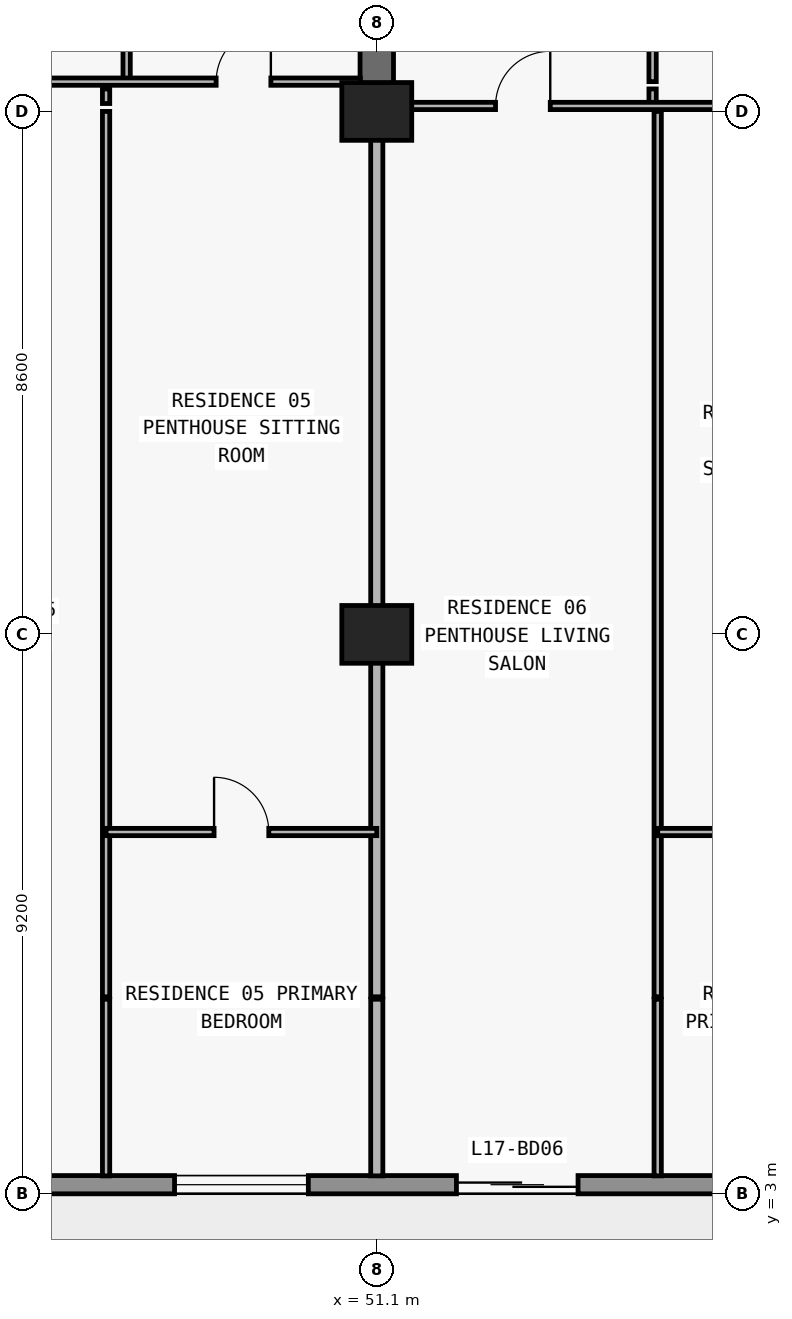
"""IFC4 building model, lengths in metres.
Left out: names, types, materials, properties, quantities, classifications, styles, units other than length and angle.
Written with IfcOpenShell. Run it as: python <this file> out.ifc"""

import sys

from ifc_helpers import new_model, si_unit, direction, frame, frame_2d, origin, origin_2d, place, context, subcontext, project, spatial, rectangle, extrude, element, fill, save


model = new_model("IFC4")
c1 = context("Model", 3, precision=1e-05, world=origin(), true_north=direction((0.0, 1.0)))
c2 = subcontext(c1, "Body", "Model", "MODEL_VIEW")
j1 = project(units=[si_unit("LENGTHUNIT", "METRE"), si_unit("PLANEANGLEUNIT", "RADIAN")], contexts=[c1])
p1 = place(None, origin())
s1 = spatial("IfcSite", under=j1, at=p1, CompositionType="ELEMENT")
p2 = place(p1, origin())
s2 = spatial("IfcBuilding", under=s1, at=p2, CompositionType="ELEMENT")
p3 = place(p2, frame((0.0, 0.0, 66.3)))
s3 = spatial("IfcBuildingStorey", under=s2, at=p3, CompositionType="ELEMENT", Elevation=66.3)
for number, where, z_axis, x_axis in (
    (1, (51.1, 12.2, 0.0), (0.0, 0.0, 1.0), (1.0, 0.0, 0.0)),
    (2, (51.1, 20.8, 0.0), (0.0, 0.0, 1.0), (1.0, 0.0, 0.0)),
):
    element("IfcColumn", number, at=place(p3, frame(where, z_axis=z_axis, x_axis=x_axis)), inside=s3, PredefinedType="COLUMN", context=c2, shape_type="SweptSolid", body=[
        extrude(rectangle(XDim=1.15, YDim=0.95, at=origin_2d()), origin(), (0.0, 0.0, 1.0), 3.05),
    ])
p4 = place(p3, frame((51.1, 20.8, 0.0), z_axis=(0.0, 0.0, 1.0), x_axis=(0.0, 1.0, 0.0)))
e3 = element("IfcWall", 3, at=p4, inside=s3, PredefinedType="SHEAR", context=c2, shape_type="SweptSolid", body=[
    extrude(rectangle(XDim=8.6, YDim=0.55, at=frame_2d((4.3, 0.0))), origin(), (0.0, 0.0, 1.0), 3.05),
])
p5 = place(p3, frame((72.7, 3.15, 0.0), z_axis=(0.0, 0.0, 1.0), x_axis=(-1.0, 0.0, 0.0)))
e4 = element("IfcWall", 4, at=p5, inside=s3, PredefinedType="STANDARD", context=c2, shape_type="SweptSolid", body=[
    extrude(rectangle(XDim=67.6, YDim=0.3, at=frame_2d((33.8, 0.0))), origin(), (0.0, 0.0, 1.0), 3.05),
])
p6 = place(p5, frame((59.826, 0.0, 0.0)))
e5 = element("IfcOpeningElement", 5, at=p6, cuts=e4, PredefinedType="OPENING", context=c2, shape_type="SweptSolid", body=[
    extrude(rectangle(XDim=2.0, YDim=2.3, at=frame_2d((1.0, 1.15))), frame((0.0, 0.16, 0.0), z_axis=(0.0, -1.0, 0.0), x_axis=(1.0, 0.0, 0.0)), (0.0, 0.0, 1.0), 0.32),
])
p7 = place(p5, frame((55.526, 0.0, 0.85)))
e6 = element("IfcOpeningElement", 6, at=p7, cuts=e4, PredefinedType="OPENING", context=c2, shape_type="SweptSolid", body=[
    extrude(rectangle(XDim=2.2, YDim=1.55, at=frame_2d((1.1, 0.775))), frame((0.0, 0.16, 0.0), z_axis=(0.0, -1.0, 0.0), x_axis=(1.0, 0.0, 0.0)), (0.0, 0.0, 1.0), 0.32),
])
p8 = place(p5, frame((51.09, 0.0, 0.0)))
e7 = element("IfcOpeningElement", 7, at=p8, cuts=e4, PredefinedType="OPENING", context=c2, shape_type="SweptSolid", body=[
    extrude(rectangle(XDim=2.0, YDim=2.3, at=frame_2d((1.0, 1.15))), frame((0.0, 0.16, 0.0), z_axis=(0.0, -1.0, 0.0), x_axis=(1.0, 0.0, 0.0)), (0.0, 0.0, 1.0), 0.32),
])
p9 = place(p5, frame((46.99, 0.0, 0.85)))
e8 = element("IfcOpeningElement", 8, at=p9, cuts=e4, PredefinedType="OPENING", context=c2, shape_type="SweptSolid", body=[
    extrude(rectangle(XDim=1.8, YDim=1.55, at=frame_2d((0.9, 0.775))), frame((0.0, 0.16, 0.0), z_axis=(0.0, -1.0, 0.0), x_axis=(1.0, 0.0, 0.0)), (0.0, 0.0, 1.0), 0.32),
])
p10 = place(p5, frame((43.026, 0.0, 0.0)))
e9 = element("IfcOpeningElement", 9, at=p10, cuts=e4, PredefinedType="OPENING", context=c2, shape_type="SweptSolid", body=[
    extrude(rectangle(XDim=2.0, YDim=2.3, at=frame_2d((1.0, 1.15))), frame((0.0, 0.16, 0.0), z_axis=(0.0, -1.0, 0.0), x_axis=(1.0, 0.0, 0.0)), (0.0, 0.0, 1.0), 0.32),
])
p11 = place(p5, frame((38.726, 0.0, 0.85)))
e10 = element("IfcOpeningElement", 10, at=p11, cuts=e4, PredefinedType="OPENING", context=c2, shape_type="SweptSolid", body=[
    extrude(rectangle(XDim=2.2, YDim=1.55, at=frame_2d((1.1, 0.775))), frame((0.0, 0.16, 0.0), z_axis=(0.0, -1.0, 0.0), x_axis=(1.0, 0.0, 0.0)), (0.0, 0.0, 1.0), 0.32),
])
p12 = place(p5, frame((34.51, 0.0, 0.0)))
e11 = element("IfcOpeningElement", 11, at=p12, cuts=e4, PredefinedType="OPENING", context=c2, shape_type="SweptSolid", body=[
    extrude(rectangle(XDim=2.0, YDim=2.3, at=frame_2d((1.0, 1.15))), frame((0.0, 0.16, 0.0), z_axis=(0.0, -1.0, 0.0), x_axis=(1.0, 0.0, 0.0)), (0.0, 0.0, 1.0), 0.32),
])
p13 = place(p5, frame((30.81, 0.0, 0.85)))
e12 = element("IfcOpeningElement", 12, at=p13, cuts=e4, PredefinedType="OPENING", context=c2, shape_type="SweptSolid", body=[
    extrude(rectangle(XDim=1.8, YDim=1.55, at=frame_2d((0.9, 0.775))), frame((0.0, 0.16, 0.0), z_axis=(0.0, -1.0, 0.0), x_axis=(1.0, 0.0, 0.0)), (0.0, 0.0, 1.0), 0.32),
])
p14 = place(p5, frame((27.026, 0.0, 0.0)))
e13 = element("IfcOpeningElement", 13, at=p14, cuts=e4, PredefinedType="OPENING", context=c2, shape_type="SweptSolid", body=[
    extrude(rectangle(XDim=2.0, YDim=2.3, at=frame_2d((1.0, 1.15))), frame((0.0, 0.16, 0.0), z_axis=(0.0, -1.0, 0.0), x_axis=(1.0, 0.0, 0.0)), (0.0, 0.0, 1.0), 0.32),
])
p15 = place(p5, frame((22.726, 0.0, 0.85)))
e14 = element("IfcOpeningElement", 14, at=p15, cuts=e4, PredefinedType="OPENING", context=c2, shape_type="SweptSolid", body=[
    extrude(rectangle(XDim=2.2, YDim=1.55, at=frame_2d((1.1, 0.775))), frame((0.0, 0.16, 0.0), z_axis=(0.0, -1.0, 0.0), x_axis=(1.0, 0.0, 0.0)), (0.0, 0.0, 1.0), 0.32),
])
p16 = place(p5, frame((18.29, 0.0, 0.0)))
e15 = element("IfcOpeningElement", 15, at=p16, cuts=e4, PredefinedType="OPENING", context=c2, shape_type="SweptSolid", body=[
    extrude(rectangle(XDim=2.0, YDim=2.3, at=frame_2d((1.0, 1.15))), frame((0.0, 0.16, 0.0), z_axis=(0.0, -1.0, 0.0), x_axis=(1.0, 0.0, 0.0)), (0.0, 0.0, 1.0), 0.32),
])
p17 = place(p5, frame((14.19, 0.0, 0.85)))
e16 = element("IfcOpeningElement", 16, at=p17, cuts=e4, PredefinedType="OPENING", context=c2, shape_type="SweptSolid", body=[
    extrude(rectangle(XDim=1.8, YDim=1.55, at=frame_2d((0.9, 0.775))), frame((0.0, 0.16, 0.0), z_axis=(0.0, -1.0, 0.0), x_axis=(1.0, 0.0, 0.0)), (0.0, 0.0, 1.0), 0.32),
])
p18 = place(p5, frame((10.226, 0.0, 0.0)))
e17 = element("IfcOpeningElement", 17, at=p18, cuts=e4, PredefinedType="OPENING", context=c2, shape_type="SweptSolid", body=[
    extrude(rectangle(XDim=2.0, YDim=2.3, at=frame_2d((1.0, 1.15))), frame((0.0, 0.16, 0.0), z_axis=(0.0, -1.0, 0.0), x_axis=(1.0, 0.0, 0.0)), (0.0, 0.0, 1.0), 0.32),
])
p19 = place(p5, frame((5.926, 0.0, 0.85)))
e18 = element("IfcOpeningElement", 18, at=p19, cuts=e4, PredefinedType="OPENING", context=c2, shape_type="SweptSolid", body=[
    extrude(rectangle(XDim=2.2, YDim=1.55, at=frame_2d((1.1, 0.775))), frame((0.0, 0.16, 0.0), z_axis=(0.0, -1.0, 0.0), x_axis=(1.0, 0.0, 0.0)), (0.0, 0.0, 1.0), 0.32),
])
p20 = place(p3, frame((46.648, 3.295, 0.0), z_axis=(0.0, 0.0, 1.0), x_axis=(0.0, 1.0, 0.0)))
e19 = element("IfcWall", 19, at=p20, inside=s3, PredefinedType="PARTITIONING", context=c2, shape_type="SweptSolid", body=[
    extrude(rectangle(XDim=2.905, YDim=0.12, at=frame_2d((1.453, 0.0))), origin(), (0.0, 0.0, 1.0), 3.05),
])
p21 = place(p3, frame((46.648, 6.24, 0.0), z_axis=(0.0, 0.0, 1.0), x_axis=(0.0, 1.0, 0.0)))
e20 = element("IfcWall", 20, at=p21, inside=s3, PredefinedType="PARTITIONING", context=c2, shape_type="SweptSolid", body=[
    extrude(rectangle(XDim=14.56, YDim=0.12, at=frame_2d((7.28, 0.0))), origin(), (0.0, 0.0, 1.0), 2.423),
])
p22 = place(p3, frame((46.648, 20.93, 0.0), z_axis=(0.0, 0.0, 1.0), x_axis=(0.0, 1.0, 0.0)))
e21 = element("IfcWall", 21, at=p22, inside=s3, PredefinedType="PARTITIONING", context=c2, shape_type="SweptSolid", body=[
    extrude(rectangle(XDim=0.24, YDim=0.12, at=frame_2d((0.12, 0.0))), origin(), (0.0, 0.0, 1.0), 2.423),
])
p23 = place(p3, frame((46.986, 21.29, 0.0), z_axis=(0.0, 0.0, 1.0), x_axis=(0.0, 1.0, 0.0)))
e22 = element("IfcWall", 22, at=p23, inside=s3, PredefinedType="PARTITIONING", context=c2, shape_type="SweptSolid", body=[
    extrude(rectangle(XDim=4.69, YDim=0.12, at=frame_2d((2.345, 0.0))), origin(), (0.0, 0.0, 1.0), 2.423),
])
p24 = place(p23, frame((1.895, 0.0, 0.0)))
e23 = element("IfcOpeningElement", 23, at=p24, cuts=e22, PredefinedType="OPENING", context=c2, shape_type="SweptSolid", body=[
    extrude(rectangle(XDim=0.9, YDim=2.15, at=frame_2d((0.45, 1.075))), frame((0.0, 0.07, 0.0), z_axis=(0.0, -1.0, 0.0), x_axis=(1.0, 0.0, 0.0)), (0.0, 0.0, 1.0), 0.14),
])
p25 = place(p3, frame((51.1, 3.295, 0.0), z_axis=(0.0, 0.0, 1.0), x_axis=(0.0, 1.0, 0.0)))
e24 = element("IfcWall", 24, at=p25, inside=s3, PredefinedType="PARTITIONING", context=c2, shape_type="SweptSolid", body=[
    extrude(rectangle(XDim=2.905, YDim=0.2, at=frame_2d((1.453, 0.0))), origin(), (0.0, 0.0, 1.0), 3.05),
])
p26 = place(p3, frame((51.1, 6.24, 0.0), z_axis=(0.0, 0.0, 1.0), x_axis=(0.0, 1.0, 0.0)))
e25 = element("IfcWall", 25, at=p26, inside=s3, PredefinedType="PARTITIONING", context=c2, shape_type="SweptSolid", body=[
    extrude(rectangle(XDim=14.555, YDim=0.2, at=frame_2d((7.277, 0.0))), origin(), (0.0, 0.0, 1.0), 2.11),
])
p27 = place(p3, frame((55.636, 20.93, 0.0), z_axis=(0.0, 0.0, 1.0), x_axis=(0.0, 1.0, 0.0)))
e26 = element("IfcWall", 26, at=p27, inside=s3, PredefinedType="PARTITIONING", context=c2, shape_type="SweptSolid", body=[
    extrude(rectangle(XDim=0.24, YDim=0.12, at=frame_2d((0.12, 0.0))), origin(), (0.0, 0.0, 1.0), 3.05),
])
p28 = place(p3, frame((55.636, 21.29, 0.0), z_axis=(0.0, 0.0, 1.0), x_axis=(0.0, 1.0, 0.0)))
e27 = element("IfcWall", 27, at=p28, inside=s3, PredefinedType="PARTITIONING", context=c2, shape_type="SweptSolid", body=[
    extrude(rectangle(XDim=4.69, YDim=0.12, at=frame_2d((2.345, 0.0))), origin(), (0.0, 0.0, 1.0), 3.05),
])
p29 = place(p28, frame((1.895, 0.0, 0.0)))
e28 = element("IfcOpeningElement", 28, at=p29, cuts=e27, PredefinedType="OPENING", context=c2, shape_type="SweptSolid", body=[
    extrude(rectangle(XDim=0.9, YDim=2.15, at=frame_2d((0.45, 1.075))), frame((0.0, 0.07, 0.0), z_axis=(0.0, -1.0, 0.0), x_axis=(1.0, 0.0, 0.0)), (0.0, 0.0, 1.0), 0.14),
])
p30 = place(p3, frame((55.72, 3.295, 0.0), z_axis=(0.0, 0.0, 1.0), x_axis=(0.0, 1.0, 0.0)))
e29 = element("IfcWall", 29, at=p30, inside=s3, PredefinedType="PARTITIONING", context=c2, shape_type="SweptSolid", body=[
    extrude(rectangle(XDim=2.905, YDim=0.12, at=frame_2d((1.453, 0.0))), origin(), (0.0, 0.0, 1.0), 3.05),
])
p31 = place(p3, frame((55.72, 6.24, 0.0), z_axis=(0.0, 0.0, 1.0), x_axis=(0.0, 1.0, 0.0)))
e30 = element("IfcWall", 30, at=p31, inside=s3, PredefinedType="PARTITIONING", context=c2, shape_type="SweptSolid", body=[
    extrude(rectangle(XDim=14.56, YDim=0.12, at=frame_2d((7.28, 0.0))), origin(), (0.0, 0.0, 1.0), 3.05),
])
p32 = place(p3, frame((46.648, 8.95, 0.0), z_axis=(0.0, 0.0, 1.0), x_axis=(1.0, 0.0, 0.0)))
e31 = element("IfcWall", 31, at=p32, inside=s3, PredefinedType="PARTITIONING", context=c2, shape_type="SweptSolid", body=[
    extrude(rectangle(XDim=4.452, YDim=0.12, at=frame_2d((2.226, 0.0))), origin(), (0.0, 0.0, 1.0), 3.05),
])
p33 = place(p32, frame((1.776, 0.0, 0.0)))
e32 = element("IfcOpeningElement", 32, at=p33, cuts=e31, PredefinedType="OPENING", context=c2, shape_type="SweptSolid", body=[
    extrude(rectangle(XDim=0.9, YDim=2.15, at=frame_2d((0.45, 1.075))), frame((0.0, 0.07, 0.0), z_axis=(0.0, -1.0, 0.0), x_axis=(1.0, 0.0, 0.0)), (0.0, 0.0, 1.0), 0.14),
])
p34 = place(p3, frame((55.72, 8.95, 0.0), z_axis=(0.0, 0.0, 1.0), x_axis=(1.0, 0.0, 0.0)))
e33 = element("IfcWall", 33, at=p34, inside=s3, PredefinedType="PARTITIONING", context=c2, shape_type="SweptSolid", body=[
    extrude(rectangle(XDim=3.78, YDim=0.12, at=frame_2d((1.89, 0.0))), origin(), (0.0, 0.0, 1.0), 3.05),
])
p35 = place(p34, frame((1.44, 0.0, 0.0)))
e34 = element("IfcOpeningElement", 34, at=p35, cuts=e33, PredefinedType="OPENING", context=c2, shape_type="SweptSolid", body=[
    extrude(rectangle(XDim=0.9, YDim=2.15, at=frame_2d((0.45, 1.075))), frame((0.0, 0.07, 0.0), z_axis=(0.0, -1.0, 0.0), x_axis=(1.0, 0.0, 0.0)), (0.0, 0.0, 1.0), 0.14),
])
p36 = place(p3, frame((51.37, 20.89, 0.0), z_axis=(0.0, 0.0, 1.0), x_axis=(1.0, 0.0, 0.0)))
e35 = element("IfcWall", 35, at=p36, inside=s3, PredefinedType="PARTITIONING", context=c2, shape_type="SweptSolid", body=[
    extrude(rectangle(XDim=8.13, YDim=0.12, at=frame_2d((4.065, 0.0))), origin(), (0.0, 0.0, 1.0), 2.11),
])
p37 = place(p36, frame((1.683, 0.0, 0.0)))
e36 = element("IfcOpeningElement", 36, at=p37, cuts=e35, PredefinedType="OPENING", context=c2, shape_type="SweptSolid", body=[
    extrude(rectangle(XDim=0.9, YDim=2.06, at=frame_2d((0.45, 1.03))), frame((0.0, 0.07, 0.0), z_axis=(0.0, -1.0, 0.0), x_axis=(1.0, 0.0, 0.0)), (0.0, 0.0, 1.0), 0.14),
])
p38 = place(p36, frame((5.79, 0.0, 0.0)))
e37 = element("IfcOpeningElement", 37, at=p38, cuts=e35, PredefinedType="OPENING", context=c2, shape_type="SweptSolid", body=[
    extrude(rectangle(XDim=0.9, YDim=2.06, at=frame_2d((0.45, 1.03))), frame((0.0, 0.07, 0.0), z_axis=(0.0, -1.0, 0.0), x_axis=(1.0, 0.0, 0.0)), (0.0, 0.0, 1.0), 0.14),
])
p39 = place(p3, frame((42.7, 21.29, 0.0), z_axis=(0.0, 0.0, 1.0), x_axis=(1.0, 0.0, 0.0)))
e38 = element("IfcWall", 38, at=p39, inside=s3, PredefinedType="PARTITIONING", context=c2, shape_type="SweptSolid", body=[
    extrude(rectangle(XDim=8.13, YDim=0.12, at=frame_2d((4.065, 0.0))), origin(), (0.0, 0.0, 1.0), 3.05),
])
p40 = place(p39, frame((1.524, 0.0, 0.0)))
e39 = element("IfcOpeningElement", 39, at=p40, cuts=e38, PredefinedType="OPENING", context=c2, shape_type="SweptSolid", body=[
    extrude(rectangle(XDim=0.9, YDim=2.15, at=frame_2d((0.45, 1.075))), frame((0.0, 0.07, 0.0), z_axis=(0.0, -1.0, 0.0), x_axis=(1.0, 0.0, 0.0)), (0.0, 0.0, 1.0), 0.14),
])
p41 = place(p39, frame((5.758, 0.0, 0.0)))
e40 = element("IfcOpeningElement", 40, at=p41, cuts=e38, PredefinedType="OPENING", context=c2, shape_type="SweptSolid", body=[
    extrude(rectangle(XDim=0.9, YDim=2.15, at=frame_2d((0.45, 1.075))), frame((0.0, 0.07, 0.0), z_axis=(0.0, -1.0, 0.0), x_axis=(1.0, 0.0, 0.0)), (0.0, 0.0, 1.0), 0.14),
])
p42 = place(p15, origin())
e41 = element("IfcWindow", 41, at=p42, inside=s3, PartitioningType="SINGLE_PANEL", PredefinedType="WINDOW", context=c2, shape_type="SweptSolid", body=[
    extrude(rectangle(XDim=2.2, YDim=1.55, at=frame_2d((1.1, 0.775))), frame((0.0, 0.03, 0.0), z_axis=(0.0, -1.0, 0.0), x_axis=(1.0, 0.0, 0.0)), (0.0, 0.0, 1.0), 0.06),
])
fill(e14, e41)
p43 = place(p16, origin())
e42 = element("IfcDoor", 42, at=p43, inside=s3, OperationType="DOUBLE_DOOR_SLIDING", PredefinedType="DOOR", context=c2, shape_type="SweptSolid", body=[
    extrude(rectangle(XDim=2.0, YDim=2.3, at=frame_2d((1.0, 1.15))), frame((0.0, 0.025, 0.0), z_axis=(0.0, -1.0, 0.0), x_axis=(1.0, 0.0, 0.0)), (0.0, 0.0, 1.0), 0.05),
])
fill(e15, e42)
p44 = place(p41, origin())
e43 = element("IfcDoor", 43, at=p44, inside=s3, OperationType="SINGLE_SWING_RIGHT", PredefinedType="DOOR", context=c2, shape_type="SweptSolid", body=[
    extrude(rectangle(XDim=0.9, YDim=2.15, at=frame_2d((0.45, 1.075))), frame((0.0, 0.025, 0.0), z_axis=(0.0, -1.0, 0.0), x_axis=(1.0, 0.0, 0.0)), (0.0, 0.0, 1.0), 0.05),
])
fill(e40, e43)
p45 = place(p33, origin())
e44 = element("IfcDoor", 44, at=p45, inside=s3, OperationType="SINGLE_SWING_LEFT", PredefinedType="DOOR", context=c2, shape_type="SweptSolid", body=[
    extrude(rectangle(XDim=0.9, YDim=2.15, at=frame_2d((0.45, 1.075))), frame((0.0, 0.025, 0.0), z_axis=(0.0, -1.0, 0.0), x_axis=(1.0, 0.0, 0.0)), (0.0, 0.0, 1.0), 0.05),
])
fill(e32, e44)
p46 = place(p37, origin())
e45 = element("IfcDoor", 45, at=p46, inside=s3, OperationType="SINGLE_SWING_RIGHT", PredefinedType="DOOR", context=c2, shape_type="SweptSolid", body=[
    extrude(rectangle(XDim=0.9, YDim=2.06, at=frame_2d((0.45, 1.03))), frame((0.0, 0.025, 0.0), z_axis=(0.0, -1.0, 0.0), x_axis=(1.0, 0.0, 0.0)), (0.0, 0.0, 1.0), 0.05),
])
fill(e36, e45)
save(model, sys.argv[1])
